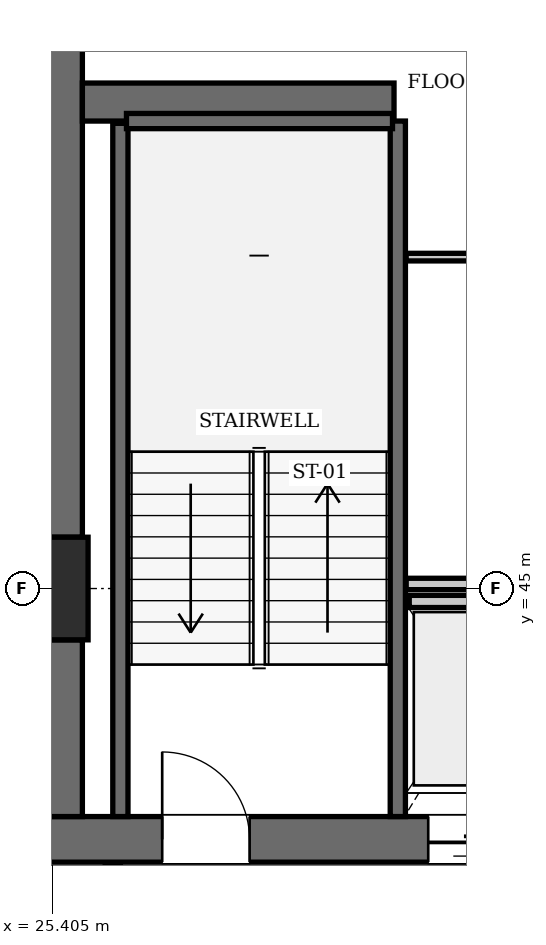
"""IFC4 building model, lengths in metres.
Left out: names, types, materials, properties, quantities, classifications, styles, units other than length and angle.
Written with IfcOpenShell. Run it as: python <this file> out.ifc"""

import sys

from ifc_helpers import new_model, si_unit, direction, frame, frame_2d, origin, origin_2d, place, context, subcontext, project, spatial, rectangle, extrude, element, fill, save


model = new_model("IFC4")
c1 = context("Model", 3, precision=1e-05, world=origin(), true_north=direction((0.0, 1.0)))
c2 = subcontext(c1, "Body", "Model", "MODEL_VIEW")
j1 = project(units=[si_unit("LENGTHUNIT", "METRE"), si_unit("PLANEANGLEUNIT", "RADIAN")], contexts=[c1])
p1 = place(None, origin())
s1 = spatial("IfcSite", under=j1, at=p1, CompositionType="ELEMENT")
p2 = place(p1, origin())
s2 = spatial("IfcBuilding", under=s1, at=p2, CompositionType="ELEMENT")
p3 = place(p2, frame((0.0, 0.0, 325.85)))
s3 = spatial("IfcBuildingStorey", under=s2, at=p3, CompositionType="ELEMENT", Elevation=325.85)
p4 = place(p3, frame((25.2, 45.0, 0.0), z_axis=(0.0, 0.0, 1.0), x_axis=(1.0, 0.0, 0.0)))
e1 = element("IfcColumn", 1, at=p4, inside=s3, PredefinedType="COLUMN", context=c2, shape_type="SweptSolid", body=[
    extrude(rectangle(XDim=1.35, YDim=1.35, at=origin_2d()), origin(), (0.0, 0.0, 1.0), 3.85),
])
p5 = place(p3, frame((25.2, 41.7, 0.0), z_axis=(0.0, 0.0, 1.0), x_axis=(1.0, 0.0, 0.0)))
e2 = element("IfcWall", 2, at=p5, inside=s3, PredefinedType="SHEAR", context=c2, shape_type="SweptSolid", body=[
    extrude(rectangle(XDim=6.8, YDim=0.6, at=frame_2d((3.4, 0.0))), origin(), (0.0, 0.0, 1.0), 3.85),
])
p6 = place(p5, frame((1.65, 0.0, 0.0)))
e3 = element("IfcOpeningElement", 3, at=p6, cuts=e2, PredefinedType="OPENING", context=c2, shape_type="SweptSolid", body=[
    extrude(rectangle(XDim=1.15, YDim=2.15, at=frame_2d((0.575, 1.075))), frame((0.0, 0.31, 0.0), z_axis=(0.0, -1.0, 0.0), x_axis=(1.0, 0.0, 0.0)), (0.0, 0.0, 1.0), 0.62),
])
p7 = place(p5, frame((5.15, 0.0, 0.0)))
e4 = element("IfcOpeningElement", 4, at=p7, cuts=e2, PredefinedType="OPENING", context=c2, shape_type="SweptSolid", body=[
    extrude(rectangle(XDim=1.1, YDim=2.2, at=frame_2d((0.55, 1.1))), frame((0.0, 0.31, 0.0), z_axis=(0.0, -1.0, 0.0), x_axis=(1.0, 0.0, 0.0)), (0.0, 0.0, 1.0), 0.62),
])
p8 = place(p3, frame((25.5, 42.0, 0.0), z_axis=(0.0, 0.0, 1.0), x_axis=(0.0, 1.0, 0.0)))
e5 = element("IfcWall", 5, at=p8, inside=s3, PredefinedType="SHEAR", context=c2, shape_type="SweptSolid", body=[
    extrude(rectangle(XDim=2.325, YDim=0.6, at=frame_2d((1.163, 0.0))), origin(), (0.0, 0.0, 1.0), 3.85),
])
p9 = place(p3, frame((25.5, 45.675, 0.0), z_axis=(0.0, 0.0, 1.0), x_axis=(0.0, 1.0, 0.0)))
e6 = element("IfcWall", 6, at=p9, inside=s3, PredefinedType="SHEAR", context=c2, shape_type="SweptSolid", body=[
    extrude(rectangle(XDim=7.725, YDim=0.6, at=frame_2d((3.862, 0.0))), origin(), (0.0, 0.0, 1.0), 3.85),
])
p10 = place(p3, frame((25.8, 51.4, 0.0), z_axis=(0.0, 0.0, 1.0), x_axis=(1.0, 0.0, 0.0)))
e7 = element("IfcWall", 7, at=p10, inside=s3, PredefinedType="SHEAR", context=c2, shape_type="SweptSolid", body=[
    extrude(rectangle(XDim=4.1, YDim=0.5, at=frame_2d((2.05, 0.0))), origin(), (0.0, 0.0, 1.0), 3.85),
])
p11 = place(p3, frame((29.95, 42.0, 0.0), z_axis=(0.0, 0.0, 1.0), x_axis=(0.0, 1.0, 0.0)))
e8 = element("IfcWall", 8, at=p11, inside=s3, PredefinedType="SOLIDWALL", context=c2, shape_type="SweptSolid", body=[
    extrude(rectangle(XDim=9.15, YDim=0.2, at=frame_2d((4.575, 0.0))), origin(), (0.0, 0.0, 1.0), 3.61),
])
p12 = place(p3, frame((26.3, 42.0, 0.0), z_axis=(0.0, 0.0, 1.0), x_axis=(0.0, 1.0, 0.0)))
e9 = element("IfcWall", 9, at=p12, inside=s3, PredefinedType="SOLIDWALL", context=c2, shape_type="SweptSolid", body=[
    extrude(rectangle(XDim=9.12, YDim=0.2, at=frame_2d((4.56, 0.0))), origin(), (0.0, 0.0, 1.0), 3.61),
])
p13 = place(p3, frame((26.38, 51.15, 0.0), z_axis=(0.0, 0.0, 1.0), x_axis=(1.0, 0.0, 0.0)))
e10 = element("IfcWall", 10, at=p13, inside=s3, PredefinedType="SOLIDWALL", context=c2, shape_type="SweptSolid", body=[
    extrude(rectangle(XDim=3.5, YDim=0.2, at=frame_2d((1.75, 0.0))), origin(), (0.0, 0.0, 1.0), 3.61),
])
p14 = place(p3, frame((30.1, 44.83, 0.0), z_axis=(0.0, 0.0, 1.0), x_axis=(1.0, 0.0, 0.0)))
e11 = element("IfcWall", 11, at=p14, inside=s3, PredefinedType="SOLIDWALL", context=c2, shape_type="SweptSolid", body=[
    extrude(rectangle(XDim=1.6, YDim=0.16, at=frame_2d((0.8, 0.0))), origin(), (0.0, 0.0, 1.0), 3.61),
])
p15 = place(p3, frame((26.2, 38.31, 0.0), z_axis=(0.0, 0.0, 1.0), x_axis=(0.0, 1.0, 0.0)))
e12 = element("IfcWall", 12, at=p15, inside=s3, PredefinedType="PARTITIONING", context=c2, shape_type="SweptSolid", body=[
    extrude(rectangle(XDim=3.07, YDim=0.2, at=frame_2d((1.535, 0.0))), origin(), (0.0, 0.0, 1.0), 3.61),
])
p16 = place(p3, frame((30.06, 45.06, 0.0), z_axis=(0.0, 0.0, 1.0), x_axis=(1.0, 0.0, 0.0)))
e13 = element("IfcWall", 13, at=p16, inside=s3, PredefinedType="PARTITIONING", context=c2, shape_type="SweptSolid", body=[
    extrude(rectangle(XDim=3.18, YDim=0.15, at=frame_2d((1.59, 0.0))), origin(), (0.0, 0.0, 1.0), 3.61),
])
p17 = place(p3, frame((30.06, 49.36, 0.0), z_axis=(0.0, 0.0, 1.0), x_axis=(1.0, 0.0, 0.0)))
e14 = element("IfcWall", 14, at=p17, inside=s3, PredefinedType="PARTITIONING", context=c2, shape_type="SweptSolid", body=[
    extrude(rectangle(XDim=3.18, YDim=0.1, at=frame_2d((1.59, 0.0))), origin(), (0.0, 0.0, 1.0), 3.61),
])
p18 = place(p17, frame((1.95, 0.0, 0.0)))
e15 = element("IfcOpeningElement", 15, at=p18, cuts=e14, PredefinedType="OPENING", context=c2, shape_type="SweptSolid", body=[
    extrude(rectangle(XDim=0.8, YDim=2.05, at=frame_2d((0.4, 1.025))), frame((0.0, 0.06, 0.0), z_axis=(0.0, -1.0, 0.0), x_axis=(1.0, 0.0, 0.0)), (0.0, 0.0, 1.0), 0.12),
])
p19 = place(p6, origin())
e16 = element("IfcDoor", 16, at=p19, inside=s3, OperationType="SINGLE_SWING_LEFT", PredefinedType="DOOR", context=c2, shape_type="SweptSolid", body=[
    extrude(rectangle(XDim=1.15, YDim=2.15, at=frame_2d((0.575, 1.075))), frame((0.0, 0.025, 0.0), z_axis=(0.0, -1.0, 0.0), x_axis=(1.0, 0.0, 0.0)), (0.0, 0.0, 1.0), 0.05),
])
fill(e3, e16)
p20 = place(p7, frame((1.1, 0.0, 0.0), z_axis=(0.0, 0.0, 1.0), x_axis=(-1.0, 0.0, 0.0)))
e17 = element("IfcDoor", 17, at=p20, inside=s3, OperationType="SLIDING_TO_LEFT", PredefinedType="DOOR", context=c2, shape_type="SweptSolid", body=[
    extrude(rectangle(XDim=1.1, YDim=2.2, at=frame_2d((0.55, 1.1))), frame((0.0, 0.025, 0.0), z_axis=(0.0, -1.0, 0.0), x_axis=(1.0, 0.0, 0.0)), (0.0, 0.0, 1.0), 0.05),
])
fill(e4, e17)
save(model, sys.argv[1])
